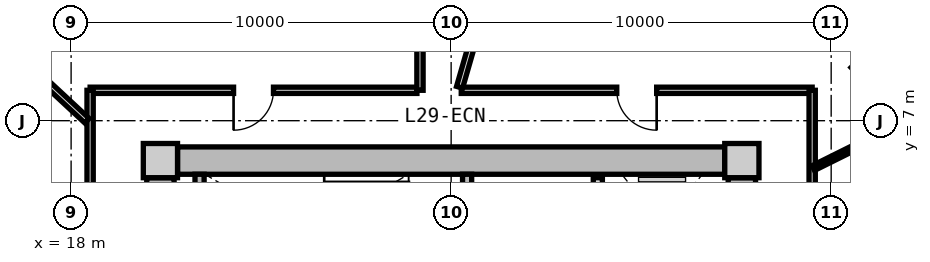
"""IFC4 building model, lengths in metres.
Left out: names, types, materials, properties, quantities, classifications, styles, units other than length and angle.
Written with IfcOpenShell. Run it as: python <this file> out.ifc"""

import sys

from ifc_helpers import new_model, si_unit, direction, frame, frame_2d, origin, origin_2d, place, context, subcontext, project, spatial, rectangle, extrude, source, transform, mapped, element, fill, save


model = new_model("IFC4")
c1 = context("Model", 3, precision=1e-05, world=origin(), true_north=direction((0.0, 1.0)))
c2 = subcontext(c1, "Body", "Model", "MODEL_VIEW")
j1 = project(units=[si_unit("LENGTHUNIT", "METRE"), si_unit("PLANEANGLEUNIT", "RADIAN")], contexts=[c1])
p1 = place(None, origin())
s1 = spatial("IfcSite", under=j1, at=p1, CompositionType="ELEMENT")
p2 = place(p1, origin())
s2 = spatial("IfcBuilding", under=s1, at=p2, CompositionType="ELEMENT")
p3 = place(p2, frame((0.0, 0.0, 96.25)))
s3 = spatial("IfcBuildingStorey", under=s2, at=p3, CompositionType="ELEMENT", Elevation=96.25)
m1 = source(origin(), c2, "Body", "SweptSolid", [
    extrude(rectangle(XDim=0.9, YDim=0.9, at=origin_2d()), origin(), (0.0, 0.0, 1.0), 3.05),
])
for number, where, z_axis, x_axis in (
    (1, (35.65, 5.95, 0.0), (0.0, 0.0, 1.0), (1.0, 0.0, 0.0)),
    (2, (20.35, 5.95, 0.0), (0.0, 0.0, 1.0), (1.0, 0.0, 0.0)),
):
    element("IfcColumn", number, at=place(p3, frame(where, z_axis=z_axis, x_axis=x_axis)), inside=s3, PredefinedType="COLUMN", context=c2, shape_type="MappedRepresentation", body=[
        mapped(m1, transform((0.0, 0.0, 0.0), x_axis=(1.0, 0.0, 0.0), y_axis=(0.0, 1.0, 0.0), z_axis=(0.0, 0.0, 1.0), scale=1.0)),
    ])
m2 = source(origin(), c2, "Body", "SweptSolid", [
    extrude(rectangle(XDim=14.4, YDim=0.72, at=frame_2d((7.2, 0.0))), origin(), (0.0, 0.0, 1.0), 2.79),
])
p4 = place(p3, frame((20.8, 5.95, 0.0), z_axis=(0.0, 0.0, 1.0), x_axis=(1.0, 0.0, 0.0)))
e3 = element("IfcWall", 3, at=p4, inside=s3, PredefinedType="SHEAR", context=c2, shape_type="MappedRepresentation", body=[
    mapped(m2, transform((0.0, 0.0, 0.0), x_axis=(1.0, 0.0, 0.0), y_axis=(0.0, 1.0, 0.0), z_axis=(0.0, 0.0, 1.0), scale=1.0)),
])
m3 = source(origin(), c2, "Body", "SweptSolid", [
    extrude(rectangle(XDim=11.0, YDim=0.72, at=frame_2d((5.5, 0.0))), origin(), (0.0, 0.0, 1.0), 2.79),
])
p5 = place(p3, frame((20.35, -5.5, 0.0), z_axis=(0.0, 0.0, 1.0), x_axis=(0.0, 1.0, 0.0)))
e4 = element("IfcWall", 4, at=p5, inside=s3, PredefinedType="SHEAR", context=c2, shape_type="MappedRepresentation", body=[
    mapped(m3, transform((0.0, 0.0, 0.0), x_axis=(1.0, 0.0, 0.0), y_axis=(0.0, 1.0, 0.0), z_axis=(0.0, 0.0, 1.0), scale=1.0)),
])
p6 = place(p5, frame((3.8, 0.0, 0.0)))
e5 = element("IfcOpeningElement", 5, at=p6, cuts=e4, PredefinedType="OPENING", context=c2, shape_type="SweptSolid", body=[
    extrude(rectangle(XDim=1.2, YDim=2.15, at=frame_2d((0.6, 1.075))), frame((0.0, 0.37, 0.0), z_axis=(0.0, -1.0, 0.0), x_axis=(1.0, 0.0, 0.0)), (0.0, 0.0, 1.0), 0.74),
])
p7 = place(p3, frame((35.65, 5.5, 0.0), z_axis=(0.0, 0.0, 1.0), x_axis=(0.0, -1.0, 0.0)))
e6 = element("IfcWall", 6, at=p7, inside=s3, PredefinedType="SHEAR", context=c2, shape_type="MappedRepresentation", body=[
    mapped(m3, transform((0.0, 0.0, 0.0), x_axis=(1.0, 0.0, 0.0), y_axis=(0.0, 1.0, 0.0), z_axis=(0.0, 0.0, 1.0), scale=1.0)),
])
p8 = place(p7, frame((5.65, 0.0, 0.0)))
e7 = element("IfcOpeningElement", 7, at=p8, cuts=e6, PredefinedType="OPENING", context=c2, shape_type="SweptSolid", body=[
    extrude(rectangle(XDim=1.2, YDim=2.15, at=frame_2d((0.6, 1.075))), frame((0.0, 0.37, 0.0), z_axis=(0.0, -1.0, 0.0), x_axis=(1.0, 0.0, 0.0)), (0.0, 0.0, 1.0), 0.74),
])
p9 = place(p7, frame((9.3, 0.0, 0.0)))
e8 = element("IfcOpeningElement", 8, at=p9, cuts=e6, PredefinedType="OPENING", context=c2, shape_type="SweptSolid", body=[
    extrude(rectangle(XDim=1.0, YDim=2.1, at=frame_2d((0.5, 1.05))), frame((0.0, 0.37, 0.0), z_axis=(0.0, -1.0, 0.0), x_axis=(1.0, 0.0, 0.0)), (0.0, 0.0, 1.0), 0.74),
])
m4 = source(origin(), c2, "Body", "SweptSolid", [
    extrude(rectangle(XDim=3.14, YDim=0.24, at=frame_2d((1.57, 0.0))), origin(), (0.0, 0.0, 1.0), 2.79),
])
p10 = place(p3, frame((21.38, 2.45, 0.0), z_axis=(0.0, 0.0, 1.0), x_axis=(0.0, 1.0, 0.0)))
e9 = element("IfcWall", 9, at=p10, inside=s3, PredefinedType="PARTITIONING", context=c2, shape_type="MappedRepresentation", body=[
    mapped(m4, transform((0.0, 0.0, 0.0), x_axis=(1.0, 0.0, 0.0), y_axis=(0.0, 1.0, 0.0), z_axis=(0.0, 0.0, 1.0), scale=1.0)),
])
p11 = place(p3, frame((28.42, 2.45, 0.0), z_axis=(0.0, 0.0, 1.0), x_axis=(0.0, 1.0, 0.0)))
e10 = element("IfcWall", 10, at=p11, inside=s3, PredefinedType="PARTITIONING", context=c2, shape_type="MappedRepresentation", body=[
    mapped(m4, transform((0.0, 0.0, 0.0), x_axis=(1.0, 0.0, 0.0), y_axis=(0.0, 1.0, 0.0), z_axis=(0.0, 0.0, 1.0), scale=1.0)),
])
p12 = place(p11, frame((0.55, 0.0, 0.0)))
e11 = element("IfcOpeningElement", 11, at=p12, cuts=e10, PredefinedType="OPENING", context=c2, shape_type="SweptSolid", body=[
    extrude(rectangle(XDim=1.1, YDim=2.15, at=frame_2d((0.55, 1.075))), frame((0.0, 0.13, 0.0), z_axis=(0.0, -1.0, 0.0), x_axis=(1.0, 0.0, 0.0)), (0.0, 0.0, 1.0), 0.26),
])
m5 = source(origin(), c2, "Body", "SweptSolid", [
    extrude(rectangle(XDim=5.0, YDim=0.24, at=frame_2d((2.5, 0.0))), origin(), (0.0, 0.0, 1.0), 2.775),
])
p13 = place(p3, frame((31.86, 0.5, 0.0), z_axis=(0.0, 0.0, 1.0), x_axis=(0.0, 1.0, 0.0)))
e12 = element("IfcWall", 12, at=p13, inside=s3, PredefinedType="PARTITIONING", context=c2, shape_type="MappedRepresentation", body=[
    mapped(m5, transform((0.0, 0.0, 0.0), x_axis=(1.0, 0.0, 0.0), y_axis=(0.0, 1.0, 0.0), z_axis=(0.0, 0.0, 1.0), scale=1.0)),
])
p14 = place(p13, frame((3.05, 0.0, 0.0)))
e13 = element("IfcOpeningElement", 13, at=p14, cuts=e12, PredefinedType="OPENING", context=c2, shape_type="SweptSolid", body=[
    extrude(rectangle(XDim=1.3, YDim=2.2, at=frame_2d((0.65, 1.1))), frame((0.0, 0.13, 0.0), z_axis=(0.0, -1.0, 0.0), x_axis=(1.0, 0.0, 0.0)), (0.0, 0.0, 1.0), 0.26),
])
p15 = place(p13, frame((0.55, 0.0, 0.0)))
e14 = element("IfcOpeningElement", 14, at=p15, cuts=e12, PredefinedType="OPENING", context=c2, shape_type="SweptSolid", body=[
    extrude(rectangle(XDim=1.3, YDim=2.2, at=frame_2d((0.65, 1.1))), frame((0.0, 0.13, 0.0), z_axis=(0.0, -1.0, 0.0), x_axis=(1.0, 0.0, 0.0)), (0.0, 0.0, 1.0), 0.26),
])
m6 = source(origin(), c2, "Body", "SweptSolid", [
    extrude(rectangle(XDim=8.6, YDim=0.165, at=frame_2d((4.3, 0.0))), origin(), (0.0, 0.0, 1.0), 2.775),
])
p16 = place(p3, frame((18.5, 7.8, 0.0), z_axis=(0.0, 0.0, 1.0), x_axis=(1.0, 0.0, 0.0)))
e15 = element("IfcWall", 15, at=p16, inside=s3, PredefinedType="PARTITIONING", context=c2, shape_type="MappedRepresentation", body=[
    mapped(m6, transform((0.0, 0.0, 0.0), x_axis=(1.0, 0.0, 0.0), y_axis=(0.0, 1.0, 0.0), z_axis=(0.0, 0.0, 1.0), scale=1.0)),
])
p17 = place(p16, frame((3.775, 0.0, 0.0)))
e16 = element("IfcOpeningElement", 16, at=p17, cuts=e15, PredefinedType="OPENING", context=c2, shape_type="SweptSolid", body=[
    extrude(rectangle(XDim=1.05, YDim=2.15, at=frame_2d((0.525, 1.075))), frame((0.0, 0.093, 0.0), z_axis=(0.0, -1.0, 0.0), x_axis=(1.0, 0.0, 0.0)), (0.0, 0.0, 1.0), 0.185),
])
m7 = source(origin(), c2, "Body", "SweptSolid", [
    extrude(rectangle(XDim=9.234, YDim=0.165, at=frame_2d((4.617, 0.0))), origin(), (0.0, 0.0, 1.0), 2.775),
])
p18 = place(p3, frame((28.266, 7.8, 0.0), z_axis=(0.0, 0.0, 1.0), x_axis=(1.0, 0.0, 0.0)))
e17 = element("IfcWall", 17, at=p18, inside=s3, PredefinedType="PARTITIONING", context=c2, shape_type="MappedRepresentation", body=[
    mapped(m7, transform((0.0, 0.0, 0.0), x_axis=(1.0, 0.0, 0.0), y_axis=(0.0, 1.0, 0.0), z_axis=(0.0, 0.0, 1.0), scale=1.0)),
])
p19 = place(p18, frame((4.092, 0.0, 0.0)))
e18 = element("IfcOpeningElement", 18, at=p19, cuts=e17, PredefinedType="OPENING", context=c2, shape_type="SweptSolid", body=[
    extrude(rectangle(XDim=1.05, YDim=2.15, at=frame_2d((0.525, 1.075))), frame((0.0, 0.093, 0.0), z_axis=(0.0, -1.0, 0.0), x_axis=(1.0, 0.0, 0.0)), (0.0, 0.0, 1.0), 0.185),
])
m8 = source(origin(), c2, "Body", "SweptSolid", [
    extrude(rectangle(XDim=15.6, YDim=0.165, at=frame_2d((7.8, 0.0))), origin(), (0.0, 0.0, 1.0), 2.775),
])
p20 = place(p3, frame((18.5, -7.8, 0.0), z_axis=(0.0, 0.0, 1.0), x_axis=(0.0, 1.0, 0.0)))
e19 = element("IfcWall", 19, at=p20, inside=s3, PredefinedType="PARTITIONING", context=c2, shape_type="MappedRepresentation", body=[
    mapped(m8, transform((0.0, 0.0, 0.0), x_axis=(1.0, 0.0, 0.0), y_axis=(0.0, 1.0, 0.0), z_axis=(0.0, 0.0, 1.0), scale=1.0)),
])
p21 = place(p20, frame((5.673, 0.0, 0.0)))
e20 = element("IfcOpeningElement", 20, at=p21, cuts=e19, PredefinedType="OPENING", context=c2, shape_type="SweptSolid", body=[
    extrude(rectangle(XDim=1.05, YDim=2.15, at=frame_2d((0.525, 1.075))), frame((0.0, 0.093, 0.0), z_axis=(0.0, -1.0, 0.0), x_axis=(1.0, 0.0, 0.0)), (0.0, 0.0, 1.0), 0.185),
])
p22 = place(p3, frame((37.5, 7.8, 0.0), z_axis=(0.0, 0.0, 1.0), x_axis=(0.0, -1.0, 0.0)))
e21 = element("IfcWall", 21, at=p22, inside=s3, PredefinedType="PARTITIONING", context=c2, shape_type="MappedRepresentation", body=[
    mapped(m8, transform((0.0, 0.0, 0.0), x_axis=(1.0, 0.0, 0.0), y_axis=(0.0, 1.0, 0.0), z_axis=(0.0, 0.0, 1.0), scale=1.0)),
])
p23 = place(p22, frame((9.482, 0.0, 0.0)))
e22 = element("IfcOpeningElement", 22, at=p23, cuts=e21, PredefinedType="OPENING", context=c2, shape_type="SweptSolid", body=[
    extrude(rectangle(XDim=1.25, YDim=2.2, at=frame_2d((0.625, 1.1))), frame((0.0, 0.093, 0.0), z_axis=(0.0, -1.0, 0.0), x_axis=(1.0, 0.0, 0.0)), (0.0, 0.0, 1.0), 0.185),
])
m9 = source(origin(), c2, "Body", "SweptSolid", [
    extrude(rectangle(XDim=8.989, YDim=0.165, at=frame_2d((4.495, 0.0))), origin(), (0.0, 0.0, 1.0), 2.275),
])
p24 = place(p3, frame((28.222, 7.88, 0.0), z_axis=(0.0, 0.0, 1.0), x_axis=(0.27702323008, 0.960863221274, 0.0)))
e23 = element("IfcWall", 23, at=p24, inside=s3, PredefinedType="PARTITIONING", context=c2, shape_type="MappedRepresentation", body=[
    mapped(m9, transform((0.0, 0.0, 0.0), x_axis=(1.0, 0.0, 0.0), y_axis=(0.0, 1.0, 0.0), z_axis=(0.0, 0.0, 1.0), scale=1.0)),
])
m10 = source(origin(), c2, "Body", "SweptSolid", [
    extrude(rectangle(XDim=7.482, YDim=0.165, at=frame_2d((3.741, 0.0))), origin(), (0.0, 0.0, 1.0), 2.275),
])
p25 = place(p3, frame((18.42, 6.998, 0.0), z_axis=(0.0, 0.0, 1.0), x_axis=(-0.732508698043, 0.680757671489, 0.0)))
e24 = element("IfcWall", 24, at=p25, inside=s3, PredefinedType="PARTITIONING", context=c2, shape_type="MappedRepresentation", body=[
    mapped(m10, transform((0.0, 0.0, 0.0), x_axis=(1.0, 0.0, 0.0), y_axis=(0.0, 1.0, 0.0), z_axis=(0.0, 0.0, 1.0), scale=1.0)),
])
m11 = source(origin(), c2, "Body", "SweptSolid", [
    extrude(rectangle(XDim=7.56, YDim=0.165, at=frame_2d((3.78, 0.0))), origin(), (0.0, 0.0, 1.0), 2.775),
])
p26 = place(p3, frame((27.18, 7.8, 0.0), z_axis=(0.0, 0.0, 1.0), x_axis=(0.0, 1.0, 0.0)))
e25 = element("IfcWall", 25, at=p26, inside=s3, PredefinedType="PARTITIONING", context=c2, shape_type="MappedRepresentation", body=[
    mapped(m11, transform((0.0, 0.0, 0.0), x_axis=(1.0, 0.0, 0.0), y_axis=(0.0, 1.0, 0.0), z_axis=(0.0, 0.0, 1.0), scale=1.0)),
])
m12 = source(origin(), c2, "Body", "SweptSolid", [
    extrude(rectangle(XDim=3.069, YDim=0.14, at=frame_2d((1.535, 0.0))), origin(), (0.0, 0.0, 1.0), 2.775),
])
p27 = place(p3, frame((18.47, 4.368, 0.0), z_axis=(0.0, 0.0, 1.0), x_axis=(-0.863524911282, 0.504306184371, 0.0)))
e26 = element("IfcWall", 26, at=p27, inside=s3, PredefinedType="PARTITIONING", context=c2, shape_type="MappedRepresentation", body=[
    mapped(m12, transform((0.0, 0.0, 0.0), x_axis=(1.0, 0.0, 0.0), y_axis=(0.0, 1.0, 0.0), z_axis=(0.0, 0.0, 1.0), scale=1.0)),
])
m13 = source(origin(), c2, "Body", "SweptSolid", [
    extrude(rectangle(XDim=1.6, YDim=0.14, at=frame_2d((0.8, 0.0))), origin(), (0.0, 0.0, 1.0), 2.775),
])
p28 = place(p3, frame((37.53, 5.754, 0.0), z_axis=(0.0, 0.0, 1.0), x_axis=(0.895522919837, 0.445015393044, 0.0)))
e27 = element("IfcWall", 27, at=p28, inside=s3, PredefinedType="PARTITIONING", context=c2, shape_type="MappedRepresentation", body=[
    mapped(m13, transform((0.0, 0.0, 0.0), x_axis=(1.0, 0.0, 0.0), y_axis=(0.0, 1.0, 0.0), z_axis=(0.0, 0.0, 1.0), scale=1.0)),
])
m14 = source(origin(), c2, "Body", "SweptSolid", [
    extrude(rectangle(XDim=3.943, YDim=0.115, at=frame_2d((1.972, 0.0))), origin(), (0.0, 0.0, 1.0), 2.775),
])
p29 = place(p3, frame((39.611, 7.37, 0.0), z_axis=(0.0, 0.0, 1.0), x_axis=(-0.699481885754, 0.714650328134, 0.0)))
e28 = element("IfcWall", 28, at=p29, inside=s3, PredefinedType="PARTITIONING", context=c2, shape_type="MappedRepresentation", body=[
    mapped(m14, transform((0.0, 0.0, 0.0), x_axis=(1.0, 0.0, 0.0), y_axis=(0.0, 1.0, 0.0), z_axis=(0.0, 0.0, 1.0), scale=1.0)),
])
p30 = place(p29, frame((1.497, 0.0, 0.0)))
e29 = element("IfcOpeningElement", 29, at=p30, cuts=e28, PredefinedType="OPENING", context=c2, shape_type="SweptSolid", body=[
    extrude(rectangle(XDim=0.95, YDim=2.1, at=frame_2d((0.475, 1.05))), frame((0.0, 0.067, 0.0), z_axis=(0.0, -1.0, 0.0), x_axis=(1.0, 0.0, 0.0)), (0.0, 0.0, 1.0), 0.135),
])
m15 = source(origin(), c2, "Body", "SweptSolid", [
    extrude(rectangle(XDim=1.05, YDim=2.15, at=frame_2d((0.525, 1.075))), frame((0.0, 0.025, 0.0), z_axis=(0.0, -1.0, 0.0), x_axis=(1.0, 0.0, 0.0)), (0.0, 0.0, 1.0), 0.05),
])
p31 = place(p17, frame((1.05, 0.0, 0.0), z_axis=(0.0, 0.0, 1.0), x_axis=(-1.0, 0.0, 0.0)))
e30 = element("IfcDoor", 30, at=p31, inside=s3, OperationType="SINGLE_SWING_RIGHT", PredefinedType="DOOR", context=c2, shape_type="MappedRepresentation", body=[
    mapped(m15, transform((0.0, 0.0, 0.0), x_axis=(1.0, 0.0, 0.0), y_axis=(0.0, 1.0, 0.0), z_axis=(0.0, 0.0, 1.0), scale=1.0)),
])
fill(e16, e30)
p32 = place(p19, frame((1.05, 0.0, 0.0), z_axis=(0.0, 0.0, 1.0), x_axis=(-1.0, 0.0, 0.0)))
e31 = element("IfcDoor", 31, at=p32, inside=s3, OperationType="SINGLE_SWING_LEFT", PredefinedType="DOOR", context=c2, shape_type="MappedRepresentation", body=[
    mapped(m15, transform((0.0, 0.0, 0.0), x_axis=(1.0, 0.0, 0.0), y_axis=(0.0, 1.0, 0.0), z_axis=(0.0, 0.0, 1.0), scale=1.0)),
])
fill(e18, e31)
m16 = source(origin(), c2, "Body", "SweptSolid", [
    extrude(rectangle(XDim=0.95, YDim=2.1, at=frame_2d((0.475, 1.05))), frame((0.0, 0.025, 0.0), z_axis=(0.0, -1.0, 0.0), x_axis=(1.0, 0.0, 0.0)), (0.0, 0.0, 1.0), 0.05),
])
p33 = place(p30, frame((0.95, 0.0, 0.0), z_axis=(0.0, 0.0, 1.0), x_axis=(-1.0, 0.0, 0.0)))
e32 = element("IfcDoor", 32, at=p33, inside=s3, OperationType="SINGLE_SWING_LEFT", PredefinedType="DOOR", context=c2, shape_type="MappedRepresentation", body=[
    mapped(m16, transform((0.0, 0.0, 0.0), x_axis=(1.0, 0.0, 0.0), y_axis=(0.0, 1.0, 0.0), z_axis=(0.0, 0.0, 1.0), scale=1.0)),
])
fill(e29, e32)
save(model, sys.argv[1])
